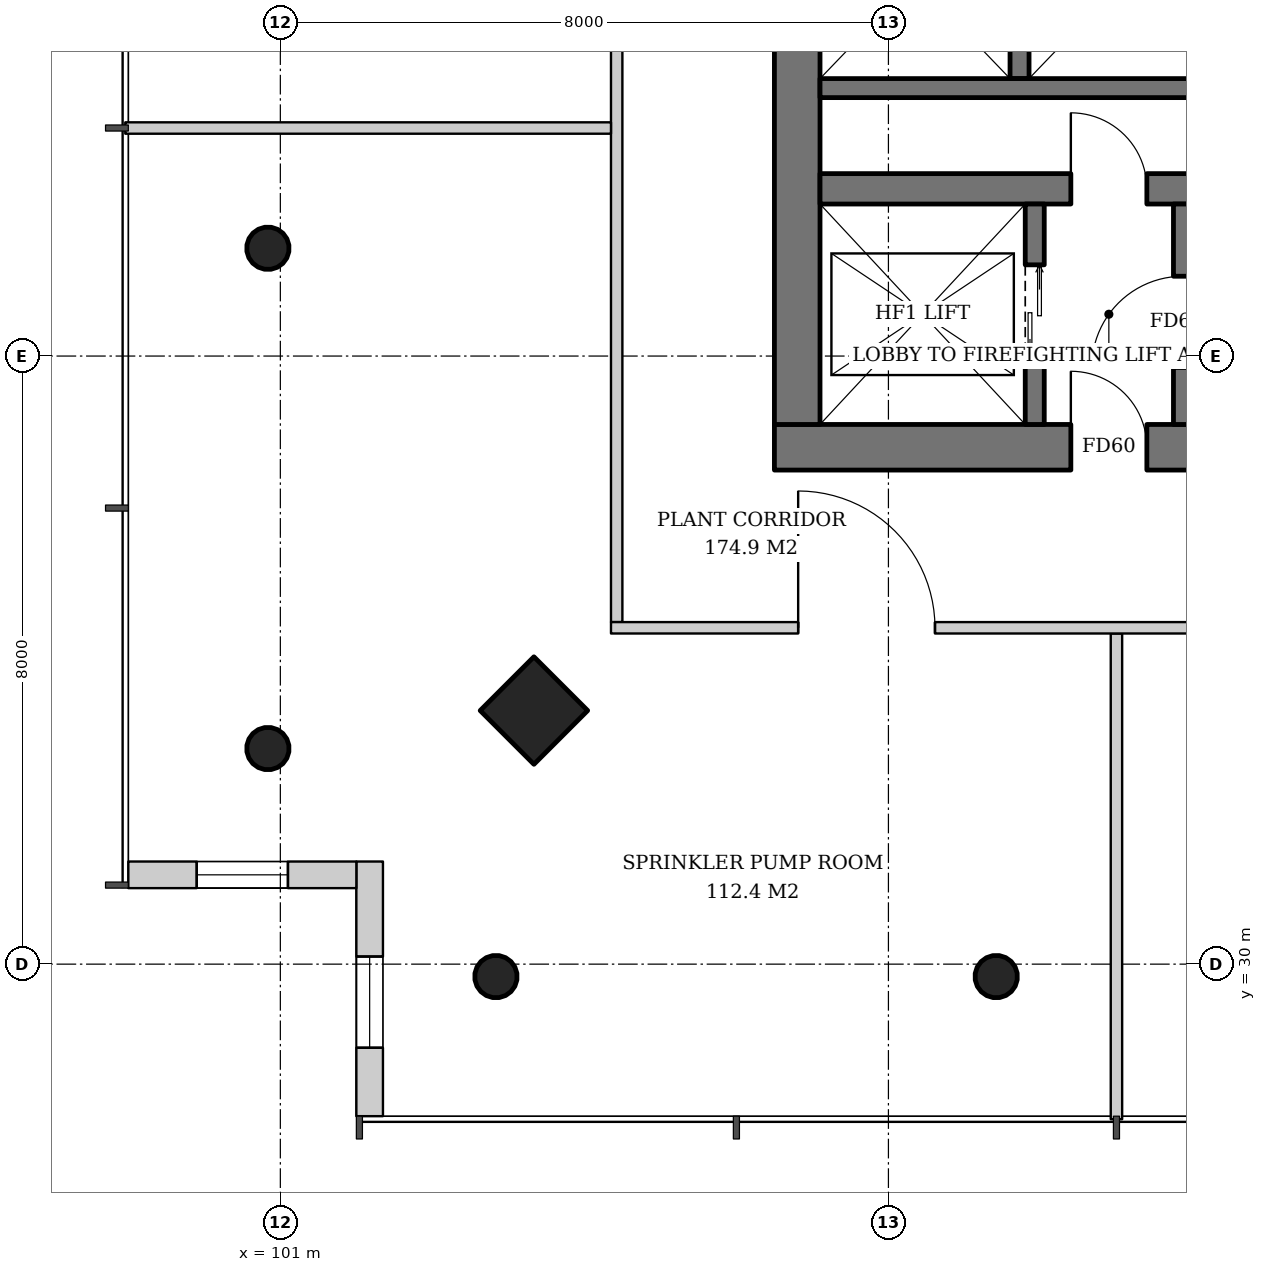
"""IFC4 building model, lengths in metres.
Left out: names, types, materials, properties, quantities, classifications, styles, units other than length and angle.
Written with IfcOpenShell. Run it as: python <this file> out.ifc"""

import sys

from ifc_helpers import new_model, si_unit, direction, frame, frame_2d, origin, origin_2d, place, context, subcontext, project, spatial, rectangle, hollow_circle, extrude, element, fill, save


model = new_model("IFC4")
c1 = context("Model", 3, precision=1e-05, world=origin(), true_north=direction((0.0, 1.0)))
c2 = subcontext(c1, "Body", "Model", "MODEL_VIEW")
j1 = project(units=[si_unit("LENGTHUNIT", "METRE"), si_unit("PLANEANGLEUNIT", "RADIAN")], contexts=[c1])
p1 = place(None, origin())
s1 = spatial("IfcSite", under=j1, at=p1, CompositionType="ELEMENT")
p2 = place(p1, origin())
s2 = spatial("IfcBuilding", under=s1, at=p2, CompositionType="ELEMENT")
p3 = place(p2, frame((0.0, 0.0, 85.6)))
s3 = spatial("IfcBuildingStorey", under=s2, at=p3, CompositionType="ELEMENT", Elevation=85.6)
p4 = place(p3, frame((104.284, 33.284, 0.0), z_axis=(0.043032401563, 0.043032401563, 0.998146494675), x_axis=(-0.707106781187, 0.707106781187, 0.0)))
e1 = element("IfcColumn", 1, at=p4, inside=s3, PredefinedType="COLUMN", context=c2, shape_type="SweptSolid", body=[
    extrude(rectangle(XDim=1.0, YDim=1.0, at=origin_2d()), origin(), (0.0, 0.0, 1.0), 3.807),
])
p5 = place(p3, frame((100.784, 32.784, 0.0), z_axis=(0.043032401563, 0.043032401563, 0.998146494675), x_axis=(-0.707106781187, 0.707106781187, 0.0)))
e2 = element("IfcColumn", 2, at=p5, inside=s3, PredefinedType="COLUMN", context=c2, shape_type="SweptSolid", body=[
    extrude(hollow_circle(Radius=0.28, WallThickness=0.02, at=origin_2d()), origin(), (0.0, 0.0, 1.0), 3.807),
])
p6 = place(p3, frame((100.784, 39.392, 0.0), z_axis=(0.04306234503, 0.02149908433, 0.998841040313), x_axis=(-0.446680166538, 0.894693706707, 0.0)))
e3 = element("IfcColumn", 3, at=p6, inside=s3, PredefinedType="COLUMN", context=c2, shape_type="SweptSolid", body=[
    extrude(hollow_circle(Radius=0.28, WallThickness=0.02, at=origin_2d()), origin(), (0.0, 0.0, 1.0), 3.804),
])
p7 = place(p3, frame((103.784, 29.784, 0.0), z_axis=(0.043032401563, 0.043032401563, 0.998146494675), x_axis=(-0.707106781187, 0.707106781187, 0.0)))
e4 = element("IfcColumn", 4, at=p7, inside=s3, PredefinedType="COLUMN", context=c2, shape_type="SweptSolid", body=[
    extrude(hollow_circle(Radius=0.28, WallThickness=0.02, at=origin_2d()), origin(), (0.0, 0.0, 1.0), 3.807),
])
p8 = place(p3, frame((110.392, 29.784, 0.0), z_axis=(0.02149908433, 0.04306234503, 0.998841040313), x_axis=(-0.894693706707, 0.446680166538, 0.0)))
e5 = element("IfcColumn", 5, at=p8, inside=s3, PredefinedType="COLUMN", context=c2, shape_type="SweptSolid", body=[
    extrude(hollow_circle(Radius=0.28, WallThickness=0.02, at=origin_2d()), origin(), (0.0, 0.0, 1.0), 3.804),
])
p9 = place(p3, frame((107.5, 36.8, 0.0), z_axis=(0.0, 0.0, 1.0), x_axis=(1.0, 0.0, 0.0)))
e6 = element("IfcWall", 6, at=p9, inside=s3, PredefinedType="SHEAR", context=c2, shape_type="SweptSolid", body=[
    extrude(rectangle(XDim=19.0, YDim=0.6, at=frame_2d((9.5, 0.0))), origin(), (0.0, 0.0, 1.0), 3.8),
])
p10 = place(p9, frame((3.9, 0.0, 0.0)))
e7 = element("IfcOpeningElement", 7, at=p10, cuts=e6, PredefinedType="OPENING", context=c2, shape_type="SweptSolid", body=[
    extrude(rectangle(XDim=1.0, YDim=2.1, at=frame_2d((0.5, 1.05))), frame((0.0, 0.31, 0.0), z_axis=(0.0, -1.0, 0.0), x_axis=(1.0, 0.0, 0.0)), (0.0, 0.0, 1.0), 0.62),
])
p11 = place(p9, frame((15.615, 0.0, 0.0)))
e8 = element("IfcOpeningElement", 8, at=p11, cuts=e6, PredefinedType="OPENING", context=c2, shape_type="SweptSolid", body=[
    extrude(rectangle(XDim=1.0, YDim=2.1, at=frame_2d((0.5, 1.05))), frame((0.0, 0.31, 0.0), z_axis=(0.0, -1.0, 0.0), x_axis=(1.0, 0.0, 0.0)), (0.0, 0.0, 1.0), 0.62),
])
p12 = place(p3, frame((107.8, 37.1, 0.0), z_axis=(0.0, 0.0, 1.0), x_axis=(0.0, 1.0, 0.0)))
e9 = element("IfcWall", 9, at=p12, inside=s3, PredefinedType="SHEAR", context=c2, shape_type="SweptSolid", body=[
    extrude(rectangle(XDim=17.8, YDim=0.6, at=frame_2d((8.9, 0.0))), origin(), (0.0, 0.0, 1.0), 3.8),
])
p13 = place(p12, frame((8.0, 0.0, 0.0)))
e10 = element("IfcOpeningElement", 10, at=p13, cuts=e9, PredefinedType="OPENING", context=c2, shape_type="SweptSolid", body=[
    extrude(rectangle(XDim=1.8, YDim=2.4, at=frame_2d((0.9, 1.2))), frame((0.0, 0.31, 0.0), z_axis=(0.0, -1.0, 0.0), x_axis=(1.0, 0.0, 0.0)), (0.0, 0.0, 1.0), 0.62),
])
p14 = place(p3, frame((108.1, 40.2, 0.0), z_axis=(0.0, 0.0, 1.0), x_axis=(1.0, 0.0, 0.0)))
e11 = element("IfcWall", 11, at=p14, inside=s3, PredefinedType="SHEAR", context=c2, shape_type="SweptSolid", body=[
    extrude(rectangle(XDim=17.8, YDim=0.4, at=frame_2d((8.9, 0.0))), origin(), (0.0, 0.0, 1.0), 3.8),
])
p15 = place(p14, frame((3.3, 0.0, 0.0)))
e12 = element("IfcOpeningElement", 12, at=p15, cuts=e11, PredefinedType="OPENING", context=c2, shape_type="SweptSolid", body=[
    extrude(rectangle(XDim=1.0, YDim=2.1, at=frame_2d((0.5, 1.05))), frame((0.0, 0.21, 0.0), z_axis=(0.0, -1.0, 0.0), x_axis=(1.0, 0.0, 0.0)), (0.0, 0.0, 1.0), 0.42),
])
p16 = place(p3, frame((102.175, 28.0, 0.0), z_axis=(0.0, 0.0, 1.0), x_axis=(0.0, 1.0, 0.0)))
e13 = element("IfcWall", 13, at=p16, inside=s3, PredefinedType="SOLIDWALL", context=c2, shape_type="SweptSolid", body=[
    extrude(rectangle(XDim=3.35, YDim=0.35, at=frame_2d((1.675, 0.0))), origin(), (0.0, 0.0, 1.0), 3.6),
])
p17 = place(p16, frame((0.9, 0.0, 0.6)))
e14 = element("IfcOpeningElement", 14, at=p17, cuts=e13, PredefinedType="OPENING", context=c2, shape_type="SweptSolid", body=[
    extrude(rectangle(XDim=1.2, YDim=2.55, at=frame_2d((0.6, 1.275))), frame((0.0, 0.185, 0.0), z_axis=(0.0, -1.0, 0.0), x_axis=(1.0, 0.0, 0.0)), (0.0, 0.0, 1.0), 0.37),
])
p18 = place(p3, frame((102.0, 31.175, 0.0), z_axis=(0.0, 0.0, 1.0), x_axis=(-1.0, 0.0, 0.0)))
e15 = element("IfcWall", 15, at=p18, inside=s3, PredefinedType="SOLIDWALL", context=c2, shape_type="SweptSolid", body=[
    extrude(rectangle(XDim=3.0, YDim=0.35, at=frame_2d((1.5, 0.0))), origin(), (0.0, 0.0, 1.0), 3.6),
])
p19 = place(p18, frame((0.9, 0.0, 0.6)))
e16 = element("IfcOpeningElement", 16, at=p19, cuts=e15, PredefinedType="OPENING", context=c2, shape_type="SweptSolid", body=[
    extrude(rectangle(XDim=1.2, YDim=2.55, at=frame_2d((0.6, 1.275))), frame((0.0, 0.185, 0.0), z_axis=(0.0, -1.0, 0.0), x_axis=(1.0, 0.0, 0.0)), (0.0, 0.0, 1.0), 0.37),
])
p20 = place(p3, frame((110.925, 37.1, 0.0), z_axis=(0.0, 0.0, 1.0), x_axis=(0.0, 1.0, 0.0)))
e17 = element("IfcWall", 17, at=p20, inside=s3, PredefinedType="SHEAR", context=c2, shape_type="SweptSolid", body=[
    extrude(rectangle(XDim=2.9, YDim=0.25, at=frame_2d((1.45, 0.0))), origin(), (0.0, 0.0, 1.0), 3.8),
])
p21 = place(p20, frame((0.8, 0.0, 0.0)))
e18 = element("IfcOpeningElement", 18, at=p21, cuts=e17, PredefinedType="OPENING", context=c2, shape_type="SweptSolid", body=[
    extrude(rectangle(XDim=1.3, YDim=2.2, at=frame_2d((0.65, 1.1))), frame((0.0, 0.135, 0.0), z_axis=(0.0, -1.0, 0.0), x_axis=(1.0, 0.0, 0.0)), (0.0, 0.0, 1.0), 0.27),
])
p22 = place(p3, frame((112.875, 37.1, 0.0), z_axis=(0.0, 0.0, 1.0), x_axis=(0.0, 1.0, 0.0)))
e19 = element("IfcWall", 19, at=p22, inside=s3, PredefinedType="SHEAR", context=c2, shape_type="SweptSolid", body=[
    extrude(rectangle(XDim=2.9, YDim=0.25, at=frame_2d((1.45, 0.0))), origin(), (0.0, 0.0, 1.0), 3.8),
])
p23 = place(p22, frame((0.75, 0.0, 0.0)))
e20 = element("IfcOpeningElement", 20, at=p23, cuts=e19, PredefinedType="OPENING", context=c2, shape_type="SweptSolid", body=[
    extrude(rectangle(XDim=1.2, YDim=2.1, at=frame_2d((0.6, 1.05))), frame((0.0, 0.135, 0.0), z_axis=(0.0, -1.0, 0.0), x_axis=(1.0, 0.0, 0.0)), (0.0, 0.0, 1.0), 0.27),
])
p24 = place(p3, frame((110.725, 44.25, 0.0), z_axis=(0.0, 0.0, 1.0), x_axis=(0.0, -1.0, 0.0)))
e21 = element("IfcWall", 21, at=p24, inside=s3, PredefinedType="SHEAR", context=c2, shape_type="SweptSolid", body=[
    extrude(rectangle(XDim=2.6, YDim=0.25, at=frame_2d((1.3, 0.0))), origin(), (0.0, 0.0, 1.0), 3.8),
])
p25 = place(p3, frame((108.1, 41.525, 0.0), z_axis=(0.0, 0.0, 1.0), x_axis=(1.0, 0.0, 0.0)))
e22 = element("IfcWall", 22, at=p25, inside=s3, PredefinedType="SHEAR", context=c2, shape_type="SweptSolid", body=[
    extrude(rectangle(XDim=11.0, YDim=0.25, at=frame_2d((5.5, 0.0))), origin(), (0.0, 0.0, 1.0), 3.8),
])
p26 = place(p3, frame((105.425, 57.65, 0.0), z_axis=(0.0, 0.0, 1.0), x_axis=(0.0, -1.0, 0.0)))
e23 = element("IfcWall", 23, at=p26, inside=s3, PredefinedType="SOLIDWALL", context=c2, shape_type="SweptSolid", body=[
    extrude(rectangle(XDim=23.15, YDim=0.15, at=frame_2d((11.575, 0.0))), origin(), (0.0, 0.0, 1.0), 2.9),
])
p27 = place(p26, frame((2.462, 0.0, 0.0)))
e24 = element("IfcOpeningElement", 24, at=p27, cuts=e23, PredefinedType="OPENING", context=c2, shape_type="SweptSolid", body=[
    extrude(rectangle(XDim=1.8, YDim=2.4, at=frame_2d((0.9, 1.2))), frame((0.0, 0.085, 0.0), z_axis=(0.0, -1.0, 0.0), x_axis=(1.0, 0.0, 0.0)), (0.0, 0.0, 1.0), 0.17),
])
p28 = place(p26, frame((10.75, 0.0, 0.0)))
e25 = element("IfcOpeningElement", 25, at=p28, cuts=e23, PredefinedType="OPENING", context=c2, shape_type="SweptSolid", body=[
    extrude(rectangle(XDim=1.8, YDim=2.4, at=frame_2d((0.9, 1.2))), frame((0.0, 0.085, 0.0), z_axis=(0.0, -1.0, 0.0), x_axis=(1.0, 0.0, 0.0)), (0.0, 0.0, 1.0), 0.17),
])
p29 = place(p3, frame((105.35, 41.0, 0.0), z_axis=(0.0, 0.0, 1.0), x_axis=(-1.0, 0.0, 0.0)))
e26 = element("IfcWall", 26, at=p29, inside=s3, PredefinedType="SOLIDWALL", context=c2, shape_type="SweptSolid", body=[
    extrude(rectangle(XDim=6.39, YDim=0.15, at=frame_2d((3.195, 0.0))), origin(), (0.0, 0.0, 1.0), 3.2),
])
p30 = place(p3, frame((112.0, 34.35, 0.0), z_axis=(0.0, 0.0, 1.0), x_axis=(0.0, -1.0, 0.0)))
e27 = element("IfcWall", 27, at=p30, inside=s3, PredefinedType="SOLIDWALL", context=c2, shape_type="SweptSolid", body=[
    extrude(rectangle(XDim=6.39, YDim=0.15, at=frame_2d((3.195, 0.0))), origin(), (0.0, 0.0, 1.0), 3.0),
])
p31 = place(p3, frame((105.35, 34.425, 0.0), z_axis=(0.0, 0.0, 1.0), x_axis=(1.0, 0.0, 0.0)))
e28 = element("IfcWall", 28, at=p31, inside=s3, PredefinedType="SOLIDWALL", context=c2, shape_type="SweptSolid", body=[
    extrude(rectangle(XDim=23.15, YDim=0.15, at=frame_2d((11.575, 0.0))), origin(), (0.0, 0.0, 1.0), 2.9),
])
p32 = place(p31, frame((2.462, 0.0, 0.0)))
e29 = element("IfcOpeningElement", 29, at=p32, cuts=e28, PredefinedType="OPENING", context=c2, shape_type="SweptSolid", body=[
    extrude(rectangle(XDim=1.8, YDim=2.4, at=frame_2d((0.9, 1.2))), frame((0.0, 0.085, 0.0), z_axis=(0.0, -1.0, 0.0), x_axis=(1.0, 0.0, 0.0)), (0.0, 0.0, 1.0), 0.17),
])
p33 = place(p31, frame((10.75, 0.0, 0.0)))
e30 = element("IfcOpeningElement", 30, at=p33, cuts=e28, PredefinedType="OPENING", context=c2, shape_type="SweptSolid", body=[
    extrude(rectangle(XDim=1.8, YDim=2.4, at=frame_2d((0.9, 1.2))), frame((0.0, 0.085, 0.0), z_axis=(0.0, -1.0, 0.0), x_axis=(1.0, 0.0, 0.0)), (0.0, 0.0, 1.0), 0.17),
])
p34 = place(p17, origin())
e31 = element("IfcWindow", 31, at=p34, inside=s3, PartitioningType="SINGLE_PANEL", PredefinedType="USERDEFINED", context=c2, shape_type="SweptSolid", body=[
    extrude(rectangle(XDim=1.2, YDim=2.55, at=frame_2d((0.6, 1.275))), frame((0.0, 0.03, 0.0), z_axis=(0.0, -1.0, 0.0), x_axis=(1.0, 0.0, 0.0)), (0.0, 0.0, 1.0), 0.06),
])
fill(e14, e31)
p35 = place(p19, origin())
e32 = element("IfcWindow", 32, at=p35, inside=s3, PartitioningType="SINGLE_PANEL", PredefinedType="USERDEFINED", context=c2, shape_type="SweptSolid", body=[
    extrude(rectangle(XDim=1.2, YDim=2.55, at=frame_2d((0.6, 1.275))), frame((0.0, 0.03, 0.0), z_axis=(0.0, -1.0, 0.0), x_axis=(1.0, 0.0, 0.0)), (0.0, 0.0, 1.0), 0.06),
])
fill(e16, e32)
p36 = place(p21, origin())
e33 = element("IfcDoor", 33, at=p36, inside=s3, OperationType="DOUBLE_DOOR_SLIDING", PredefinedType="DOOR", context=c2, shape_type="SweptSolid", body=[
    extrude(rectangle(XDim=1.3, YDim=2.2, at=frame_2d((0.65, 1.1))), frame((0.0, 0.025, 0.0), z_axis=(0.0, -1.0, 0.0), x_axis=(1.0, 0.0, 0.0)), (0.0, 0.0, 1.0), 0.05),
])
fill(e18, e33)
p37 = place(p23, origin())
e34 = element("IfcDoor", 34, at=p37, inside=s3, OperationType="SINGLE_SWING_LEFT", PredefinedType="DOOR", context=c2, shape_type="SweptSolid", body=[
    extrude(rectangle(XDim=1.2, YDim=2.1, at=frame_2d((0.6, 1.05))), frame((0.0, 0.025, 0.0), z_axis=(0.0, -1.0, 0.0), x_axis=(1.0, 0.0, 0.0)), (0.0, 0.0, 1.0), 0.05),
])
fill(e20, e34)
p38 = place(p10, origin())
e35 = element("IfcDoor", 35, at=p38, inside=s3, OperationType="SINGLE_SWING_LEFT", PredefinedType="DOOR", context=c2, shape_type="SweptSolid", body=[
    extrude(rectangle(XDim=1.0, YDim=2.1, at=frame_2d((0.5, 1.05))), frame((0.0, 0.025, 0.0), z_axis=(0.0, -1.0, 0.0), x_axis=(1.0, 0.0, 0.0)), (0.0, 0.0, 1.0), 0.05),
])
fill(e7, e35)
p39 = place(p15, origin())
e36 = element("IfcDoor", 36, at=p39, inside=s3, OperationType="SINGLE_SWING_LEFT", PredefinedType="DOOR", context=c2, shape_type="SweptSolid", body=[
    extrude(rectangle(XDim=1.0, YDim=2.1, at=frame_2d((0.5, 1.05))), frame((0.0, 0.025, 0.0), z_axis=(0.0, -1.0, 0.0), x_axis=(1.0, 0.0, 0.0)), (0.0, 0.0, 1.0), 0.05),
])
fill(e12, e36)
p40 = place(p32, origin())
e37 = element("IfcDoor", 37, at=p40, inside=s3, OperationType="DOUBLE_DOOR_SINGLE_SWING", PredefinedType="DOOR", context=c2, shape_type="SweptSolid", body=[
    extrude(rectangle(XDim=1.8, YDim=2.4, at=frame_2d((0.9, 1.2))), frame((0.0, 0.025, 0.0), z_axis=(0.0, -1.0, 0.0), x_axis=(1.0, 0.0, 0.0)), (0.0, 0.0, 1.0), 0.05),
])
fill(e29, e37)
save(model, sys.argv[1])
